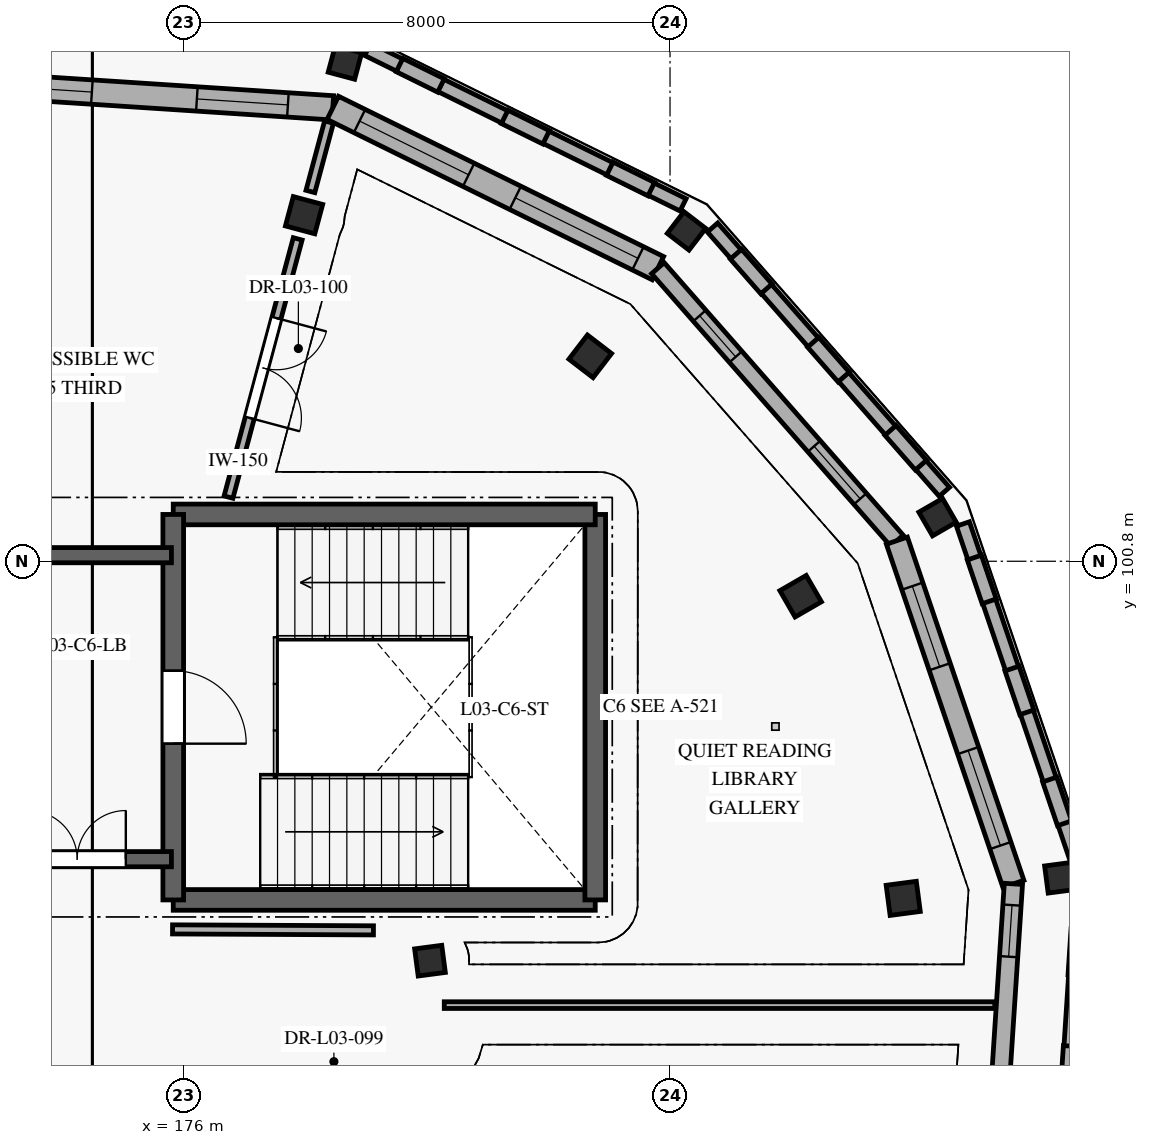
"""IFC4 building model, lengths in metres.
Left out: names, types, materials, properties, quantities, classifications, styles, units other than length and angle.
Written with IfcOpenShell. Run it as: python <this file> out.ifc"""

import sys

from ifc_helpers import new_model, si_unit, direction, frame, frame_2d, origin, origin_2d, place, context, subcontext, project, spatial, rectangle, extrude, element, fill, save


model = new_model("IFC4")
c1 = context("Model", 3, precision=1e-05, world=origin(), true_north=direction((0.0, 1.0)))
c2 = subcontext(c1, "Body", "Model", "MODEL_VIEW")
j1 = project(units=[si_unit("LENGTHUNIT", "METRE"), si_unit("PLANEANGLEUNIT", "RADIAN")], contexts=[c1])
p1 = place(None, origin())
s1 = spatial("IfcSite", under=j1, at=p1, CompositionType="ELEMENT")
p2 = place(p1, origin())
s2 = spatial("IfcBuilding", under=s1, at=p2, CompositionType="ELEMENT")
p3 = place(p2, frame((0.0, 0.0, 12.6)))
s3 = spatial("IfcBuildingStorey", under=s2, at=p3, CompositionType="ELEMENT", Elevation=12.6)
for number, where, z_axis, x_axis in (
    (1, (190.413, 95.595, 0.0), (0.0, 0.0, 1.0), (-0.131, 0.991, 0.0)),
    (2, (188.4, 101.525, 0.0), (0.0, 0.0, 1.0), (-0.5, 0.866, 0.0)),
    (3, (184.271, 106.233, 0.0), (0.0, 0.0, 1.0), (-0.793, 0.609, 0.0)),
    (4, (178.654, 109.003, 0.0), (0.0, 0.0, 1.0), (-0.966, 0.259, 0.0)),
):
    element("IfcColumn", number, at=place(p3, frame(where, z_axis=z_axis, x_axis=x_axis)), inside=s3, PredefinedType="COLUMN", context=c2, shape_type="SweptSolid", body=[
        extrude(rectangle(XDim=0.45, YDim=0.45, at=origin_2d()), origin(), (0.0, 0.0, 1.0), 4.2),
    ])
for number, where, z_axis, x_axis in (
    (5, (187.835, 95.256, 0.0), (0.0, 0.0, 1.0), (-0.131, 0.991, 0.0)),
    (6, (186.148, 100.225, 0.0), (0.0, 0.0, 1.0), (-0.5, 0.866, 0.0)),
    (7, (182.688, 104.171, 0.0), (0.0, 0.0, 1.0), (-0.793, 0.609, 0.0)),
    (8, (177.981, 106.492, 0.0), (0.0, 0.0, 1.0), (-0.966, 0.259, 0.0)),
):
    element("IfcColumn", number, at=place(p3, frame(where, z_axis=z_axis, x_axis=x_axis)), inside=s3, PredefinedType="COLUMN", context=c2, shape_type="SweptSolid", body=[
        extrude(rectangle(XDim=0.5, YDim=0.5, at=origin_2d()), origin(), (0.0, 0.0, 1.0), 4.2),
    ])
p4 = place(p3, frame((180.052, 94.231, 0.0), z_axis=(0.0, 0.0, 1.0), x_axis=(0.991444861374, 0.13052619222, 0.0)))
e9 = element("IfcColumn", 9, at=p4, inside=s3, PredefinedType="COLUMN", context=c2, shape_type="SweptSolid", body=[
    extrude(rectangle(XDim=0.45, YDim=0.45, at=origin_2d()), origin(), (0.0, 0.0, 1.0), 4.2),
])
p5 = place(p3, frame((172.506, 108.647, 0.0), z_axis=(0.0, 0.0, 1.0), x_axis=(0.997858658418, -0.065407169492, 0.0)))
e10 = element("IfcWall", 10, at=p5, inside=s3, PredefinedType="SOLIDWALL", context=c2, shape_type="SweptSolid", body=[
    extrude(rectangle(XDim=5.961, YDim=0.4, at=frame_2d((2.98, 0.0))), origin(), (0.0, 0.0, 1.0), 3.94),
])
p6 = place(p5, frame((0.99, 0.0, 0.85)))
e11 = element("IfcOpeningElement", 11, at=p6, cuts=e10, PredefinedType="OPENING", context=c2, shape_type="SweptSolid", body=[
    extrude(rectangle(XDim=1.0, YDim=1.3, at=frame_2d((0.5, 0.65))), frame((0.0, 0.21, 0.0), z_axis=(0.0, -1.0, 0.0), x_axis=(1.0, 0.0, 0.0)), (0.0, 0.0, 1.0), 0.42),
])
p7 = place(p5, frame((3.721, 0.0, 0.85)))
e12 = element("IfcOpeningElement", 12, at=p7, cuts=e10, PredefinedType="OPENING", context=c2, shape_type="SweptSolid", body=[
    extrude(rectangle(XDim=1.5, YDim=1.3, at=frame_2d((0.75, 0.65))), frame((0.0, 0.21, 0.0), z_axis=(0.0, -1.0, 0.0), x_axis=(1.0, 0.0, 0.0)), (0.0, 0.0, 1.0), 0.42),
])
p8 = place(p3, frame((178.454, 108.257, 0.0), z_axis=(0.0, 0.0, 1.0), x_axis=(0.896879104746, -0.442275786664, 0.0)))
e13 = element("IfcWall", 13, at=p8, inside=s3, PredefinedType="SOLIDWALL", context=c2, shape_type="SweptSolid", body=[
    extrude(rectangle(XDim=5.961, YDim=0.425, at=frame_2d((2.98, 0.0))), origin(), (0.0, 0.0, 1.0), 3.94),
])
p9 = place(p8, frame((0.49, 0.0, 0.85)))
e14 = element("IfcOpeningElement", 14, at=p9, cuts=e13, PredefinedType="OPENING", context=c2, shape_type="SweptSolid", body=[
    extrude(rectangle(XDim=2.0, YDim=1.3, at=frame_2d((1.0, 0.65))), frame((0.0, 0.222, 0.0), z_axis=(0.0, -1.0, 0.0), x_axis=(1.0, 0.0, 0.0)), (0.0, 0.0, 1.0), 0.445),
])
p10 = place(p8, frame((3.346, 0.0, 0.85)))
e15 = element("IfcOpeningElement", 15, at=p10, cuts=e13, PredefinedType="OPENING", context=c2, shape_type="SweptSolid", body=[
    extrude(rectangle(XDim=2.25, YDim=1.3, at=frame_2d((1.125, 0.65))), frame((0.0, 0.222, 0.0), z_axis=(0.0, -1.0, 0.0), x_axis=(1.0, 0.0, 0.0)), (0.0, 0.0, 1.0), 0.445),
])
p11 = place(p3, frame((183.801, 105.621, 0.0), z_axis=(0.0, 0.0, 1.0), x_axis=(0.659353757459, -0.751832842143, 0.0)))
e16 = element("IfcWall", 16, at=p11, inside=s3, PredefinedType="SOLIDWALL", context=c2, shape_type="SweptSolid", body=[
    extrude(rectangle(XDim=5.961, YDim=0.275, at=frame_2d((2.98, 0.0))), origin(), (0.0, 0.0, 1.0), 3.94),
])
p12 = place(p11, frame((1.04, 0.0, 0.85)))
e17 = element("IfcOpeningElement", 17, at=p12, cuts=e16, PredefinedType="OPENING", context=c2, shape_type="SweptSolid", body=[
    extrude(rectangle(XDim=0.9, YDim=1.6, at=frame_2d((0.45, 0.8))), frame((0.0, 0.147, 0.0), z_axis=(0.0, -1.0, 0.0), x_axis=(1.0, 0.0, 0.0)), (0.0, 0.0, 1.0), 0.295),
])
p13 = place(p11, frame((3.896, 0.0, 0.85)))
e18 = element("IfcOpeningElement", 18, at=p13, cuts=e16, PredefinedType="OPENING", context=c2, shape_type="SweptSolid", body=[
    extrude(rectangle(XDim=1.15, YDim=1.5, at=frame_2d((0.575, 0.75))), frame((0.0, 0.147, 0.0), z_axis=(0.0, -1.0, 0.0), x_axis=(1.0, 0.0, 0.0)), (0.0, 0.0, 1.0), 0.295),
])
p14 = place(p3, frame((187.731, 101.139, 0.0), z_axis=(0.0, 0.0, 1.0), x_axis=(0.321420298269, -0.94693663561, 0.0)))
e19 = element("IfcWall", 19, at=p14, inside=s3, PredefinedType="SOLIDWALL", context=c2, shape_type="SweptSolid", body=[
    extrude(rectangle(XDim=5.961, YDim=0.365, at=frame_2d((2.98, 0.0))), origin(), (0.0, 0.0, 1.0), 3.94),
])
p15 = place(p14, frame((0.79, 0.0, 0.85)))
e20 = element("IfcOpeningElement", 20, at=p15, cuts=e19, PredefinedType="OPENING", context=c2, shape_type="SweptSolid", body=[
    extrude(rectangle(XDim=1.4, YDim=1.5, at=frame_2d((0.7, 0.75))), frame((0.0, 0.192, 0.0), z_axis=(0.0, -1.0, 0.0), x_axis=(1.0, 0.0, 0.0)), (0.0, 0.0, 1.0), 0.385),
])
p16 = place(p14, frame((3.646, 0.0, 0.85)))
e21 = element("IfcOpeningElement", 21, at=p16, cuts=e19, PredefinedType="OPENING", context=c2, shape_type="SweptSolid", body=[
    extrude(rectangle(XDim=1.65, YDim=1.5, at=frame_2d((0.825, 0.75))), frame((0.0, 0.192, 0.0), z_axis=(0.0, -1.0, 0.0), x_axis=(1.0, 0.0, 0.0)), (0.0, 0.0, 1.0), 0.385),
])
p17 = place(p3, frame((189.647, 95.494, 0.0), z_axis=(0.0, 0.0, 1.0), x_axis=(-0.065407169492, -0.997858658418, 0.0)))
e22 = element("IfcWall", 22, at=p17, inside=s3, PredefinedType="SOLIDWALL", context=c2, shape_type="SweptSolid", body=[
    extrude(rectangle(XDim=5.961, YDim=0.3, at=frame_2d((2.98, 0.0))), origin(), (0.0, 0.0, 1.0), 3.94),
])
p18 = place(p17, frame((0.35, 0.0, 0.85)))
e23 = element("IfcOpeningElement", 23, at=p18, cuts=e22, PredefinedType="OPENING", context=c2, shape_type="SweptSolid", body=[
    extrude(rectangle(XDim=0.85, YDim=1.4, at=frame_2d((0.425, 0.7))), frame((0.0, 0.16, 0.0), z_axis=(0.0, -1.0, 0.0), x_axis=(1.0, 0.0, 0.0)), (0.0, 0.0, 1.0), 0.32),
])
p19 = place(p17, frame((3.396, 0.0, 0.85)))
e24 = element("IfcOpeningElement", 24, at=p19, cuts=e22, PredefinedType="OPENING", context=c2, shape_type="SweptSolid", body=[
    extrude(rectangle(XDim=2.15, YDim=1.5, at=frame_2d((1.075, 0.75))), frame((0.0, 0.16, 0.0), z_axis=(0.0, -1.0, 0.0), x_axis=(1.0, 0.0, 0.0)), (0.0, 0.0, 1.0), 0.32),
])
p20 = place(p3, frame((190.676, 95.938, 0.0), z_axis=(0.0, 0.0, 1.0), x_axis=(-0.321403850935, 0.946942218197, 0.0)))
e25 = element("IfcWall", 25, at=p20, inside=s3, PredefinedType="ELEMENTEDWALL", context=c2, shape_type="SweptSolid", body=[
    extrude(rectangle(XDim=5.782, YDim=0.225, at=frame_2d((2.891, 0.0))), origin(), (0.0, 0.0, 1.0), 1.09),
])
for number, where, z_axis, x_axis in (
    (26, (190.488, 96.49, 1.09), (0.0, 0.0, 1.0), (-0.322, 0.947, 0.0)),
    (27, (189.869, 98.316, 1.09), (0.0, 0.0, 1.0), (-0.321, 0.947, 0.0)),
    (28, (189.249, 100.141, 1.09), (0.0, 0.0, 1.0), (-0.322, 0.947, 0.0)),
):
    element("IfcWall", number, at=place(p3, frame(where, z_axis=z_axis, x_axis=x_axis)), inside=s3, PredefinedType="ELEMENTEDWALL", context=c2, shape_type="SweptSolid", body=[
        extrude(rectangle(XDim=0.76, YDim=0.245, at=frame_2d((0.38, 0.0))), origin(), (0.0, 0.0, 1.0), 2.85),
    ])
p21 = place(p3, frame((188.512, 101.942, 0.0), z_axis=(0.0, 0.0, 1.0), x_axis=(-0.659335243923, 0.751849078021, 0.0)))
e29 = element("IfcWall", 29, at=p21, inside=s3, PredefinedType="ELEMENTEDWALL", context=c2, shape_type="SweptSolid", body=[
    extrude(rectangle(XDim=5.782, YDim=0.225, at=frame_2d((2.891, 0.0))), origin(), (0.0, 0.0, 1.0), 1.09),
])
p22 = place(p3, frame((188.127, 102.381, 1.09), z_axis=(0.0, 0.0, 1.0), x_axis=(-0.659504701015, 0.751700438565, 0.0)))
e30 = element("IfcWall", 30, at=p22, inside=s3, PredefinedType="ELEMENTEDWALL", context=c2, shape_type="SweptSolid", body=[
    extrude(rectangle(XDim=0.76, YDim=0.245, at=frame_2d((0.38, 0.0))), origin(), (0.0, 0.0, 1.0), 2.85),
])
p23 = place(p3, frame((186.856, 103.83, 1.09), z_axis=(0.0, 0.0, 1.0), x_axis=(-0.659345470196, 0.751840109951, 0.0)))
e31 = element("IfcWall", 31, at=p23, inside=s3, PredefinedType="ELEMENTEDWALL", context=c2, shape_type="SweptSolid", body=[
    extrude(rectangle(XDim=0.76, YDim=0.245, at=frame_2d((0.38, 0.0))), origin(), (0.0, 0.0, 1.0), 2.85),
])
p24 = place(p3, frame((185.585, 105.279, 1.09), z_axis=(0.0, 0.0, 1.0), x_axis=(-0.659504701015, 0.751700438565, 0.0)))
e32 = element("IfcWall", 32, at=p24, inside=s3, PredefinedType="ELEMENTEDWALL", context=c2, shape_type="SweptSolid", body=[
    extrude(rectangle(XDim=0.76, YDim=0.245, at=frame_2d((0.38, 0.0))), origin(), (0.0, 0.0, 1.0), 2.85),
])
p25 = place(p3, frame((184.215, 106.662, 0.0), z_axis=(0.0, 0.0, 1.0), x_axis=(-0.896862382364, 0.442309695915, 0.0)))
e33 = element("IfcWall", 33, at=p25, inside=s3, PredefinedType="ELEMENTEDWALL", context=c2, shape_type="SweptSolid", body=[
    extrude(rectangle(XDim=5.783, YDim=0.225, at=frame_2d((2.892, 0.0))), origin(), (0.0, 0.0, 1.0), 1.09),
])
for number, where, z_axis, x_axis in (
    (34, (183.691, 106.92, 1.09), (0.0, 0.0, 1.0), (-0.897, 0.442, 0.0)),
    (35, (181.962, 107.772, 1.09), (0.0, 0.0, 1.0), (-0.897, 0.442, 0.0)),
):
    element("IfcWall", number, at=place(p3, frame(where, z_axis=z_axis, x_axis=x_axis)), inside=s3, PredefinedType="ELEMENTEDWALL", context=c2, shape_type="SweptSolid", body=[
        extrude(rectangle(XDim=0.76, YDim=0.245, at=frame_2d((0.38, 0.0))), origin(), (0.0, 0.0, 1.0), 2.85),
    ])
p26 = place(p3, frame((180.233, 108.625, 1.09), z_axis=(0.0, 0.0, 1.0), x_axis=(-0.896792285629, 0.442451801258, 0.0)))
e36 = element("IfcWall", 36, at=p26, inside=s3, PredefinedType="ELEMENTEDWALL", context=c2, shape_type="SweptSolid", body=[
    extrude(rectangle(XDim=0.76, YDim=0.245, at=frame_2d((0.38, 0.0))), origin(), (0.0, 0.0, 1.0), 2.85),
])
p27 = place(p3, frame((190.377, 89.562, 0.0), z_axis=(0.0, 0.0, 1.0), x_axis=(0.065400850615, 0.997859072584, 0.0)))
e37 = element("IfcWall", 37, at=p27, inside=s3, PredefinedType="ELEMENTEDWALL", context=c2, shape_type="SweptSolid", body=[
    extrude(rectangle(XDim=5.782, YDim=0.225, at=frame_2d((2.891, 0.0))), origin(), (0.0, 0.0, 1.0), 1.09),
])
for number, where, z_axis, x_axis in (
    (38, (190.542, 92.068, 1.09), (0.0, 0.0, 1.0), (0.066, 0.998, 0.0)),
    (39, (190.668, 93.991, 1.09), (0.0, 0.0, 1.0), (0.066, 0.998, 0.0)),
):
    element("IfcWall", number, at=place(p3, frame(where, z_axis=z_axis, x_axis=x_axis)), inside=s3, PredefinedType="ELEMENTEDWALL", context=c2, shape_type="SweptSolid", body=[
        extrude(rectangle(XDim=0.76, YDim=0.245, at=frame_2d((0.38, 0.0))), origin(), (0.0, 0.0, 1.0), 2.85),
    ])
p28 = place(p3, frame((175.83, 95.23, 0.0), z_axis=(0.0, 0.0, 1.0), x_axis=(1.0, 0.0, 0.0)))
e40 = element("IfcWall", 40, at=p28, inside=s3, PredefinedType="SHEAR", context=c2, shape_type="SweptSolid", body=[
    extrude(rectangle(XDim=6.94, YDim=0.34, at=frame_2d((3.47, 0.0))), origin(), (0.0, 0.0, 1.0), 3.95),
])
p29 = place(p3, frame((182.77, 95.23, 0.0), z_axis=(0.0, 0.0, 1.0), x_axis=(0.0, 1.0, 0.0)))
e41 = element("IfcWall", 41, at=p29, inside=s3, PredefinedType="SHEAR", context=c2, shape_type="SweptSolid", body=[
    extrude(rectangle(XDim=6.34, YDim=0.34, at=frame_2d((3.17, 0.0))), origin(), (0.0, 0.0, 1.0), 3.95),
])
p30 = place(p3, frame((182.77, 101.57, 0.0), z_axis=(0.0, 0.0, 1.0), x_axis=(-1.0, 0.0, 0.0)))
e42 = element("IfcWall", 42, at=p30, inside=s3, PredefinedType="SHEAR", context=c2, shape_type="SweptSolid", body=[
    extrude(rectangle(XDim=6.94, YDim=0.34, at=frame_2d((3.47, 0.0))), origin(), (0.0, 0.0, 1.0), 3.95),
])
p31 = place(p3, frame((175.83, 101.57, 0.0), z_axis=(0.0, 0.0, 1.0), x_axis=(0.0, -1.0, 0.0)))
e43 = element("IfcWall", 43, at=p31, inside=s3, PredefinedType="SHEAR", context=c2, shape_type="SweptSolid", body=[
    extrude(rectangle(XDim=6.34, YDim=0.34, at=frame_2d((3.17, 0.0))), origin(), (0.0, 0.0, 1.0), 3.95),
])
p32 = place(p31, frame((2.57, 0.0, 0.0)))
e44 = element("IfcOpeningElement", 44, at=p32, cuts=e43, PredefinedType="OPENING", context=c2, shape_type="SweptSolid", body=[
    extrude(rectangle(XDim=1.2, YDim=2.1, at=frame_2d((0.6, 1.05))), frame((0.0, 0.18, 0.0), z_axis=(0.0, -1.0, 0.0), x_axis=(1.0, 0.0, 0.0)), (0.0, 0.0, 1.0), 0.36),
])
p33 = place(p3, frame((172.7, 95.9, 0.0), z_axis=(0.0, 0.0, 1.0), x_axis=(1.0, 0.0, 0.0)))
e45 = element("IfcWall", 45, at=p33, inside=s3, PredefinedType="SHEAR", context=c2, shape_type="SweptSolid", body=[
    extrude(rectangle(XDim=3.1, YDim=0.25, at=frame_2d((1.55, 0.0))), origin(), (0.0, 0.0, 1.0), 3.95),
])
p34 = place(p33, frame((0.75, 0.0, 0.0)))
e46 = element("IfcOpeningElement", 46, at=p34, cuts=e45, PredefinedType="OPENING", context=c2, shape_type="SweptSolid", body=[
    extrude(rectangle(XDim=1.6, YDim=2.15, at=frame_2d((0.8, 1.075))), frame((0.0, 0.135, 0.0), z_axis=(0.0, -1.0, 0.0), x_axis=(1.0, 0.0, 0.0)), (0.0, 0.0, 1.0), 0.27),
])
p35 = place(p3, frame((175.8, 100.9, 0.0), z_axis=(0.0, 0.0, 1.0), x_axis=(-1.0, 0.0, 0.0)))
e47 = element("IfcWall", 47, at=p35, inside=s3, PredefinedType="SHEAR", context=c2, shape_type="SweptSolid", body=[
    extrude(rectangle(XDim=3.1, YDim=0.25, at=frame_2d((1.55, 0.0))), origin(), (0.0, 0.0, 1.0), 3.95),
])
p36 = place(p3, frame((189.341, 93.5, 0.0), z_axis=(0.0, 0.0, 1.0), x_axis=(-1.0, 0.0, 0.0)))
e48 = element("IfcWall", 48, at=p36, inside=s3, PredefinedType="PARTITIONING", context=c2, shape_type="SweptSolid", body=[
    extrude(rectangle(XDim=9.054, YDim=0.11, at=frame_2d((4.527, 0.0))), origin(), (0.0, 0.0, 1.0), 3.915),
])
p37 = place(p3, frame((178.392, 108.023, 0.0), z_axis=(0.0, 0.0, 1.0), x_axis=(-0.258884109648, -0.965908389948, 0.0)))
e49 = element("IfcWall", 49, at=p37, inside=s3, PredefinedType="PARTITIONING", context=c2, shape_type="SweptSolid", body=[
    extrude(rectangle(XDim=1.182, YDim=0.15, at=frame_2d((0.591, 0.0))), origin(), (0.0, 0.0, 1.0), 3.117),
])
p38 = place(p3, frame((177.877, 106.102, 0.0), z_axis=(0.0, 0.0, 1.0), x_axis=(-0.25879251633, -0.965932934262, 0.0)))
e50 = element("IfcWall", 50, at=p38, inside=s3, PredefinedType="PARTITIONING", context=c2, shape_type="SweptSolid", body=[
    extrude(rectangle(XDim=4.397, YDim=0.15, at=frame_2d((2.199, 0.0))), origin(), (0.0, 0.0, 1.0), 3.915),
])
p39 = place(p38, frame((1.348, 0.0, 0.0)))
e51 = element("IfcOpeningElement", 51, at=p39, cuts=e50, PredefinedType="OPENING", context=c2, shape_type="SweptSolid", body=[
    extrude(rectangle(XDim=1.7, YDim=2.18, at=frame_2d((0.85, 1.09))), frame((0.0, 0.085, 0.0), z_axis=(0.0, -1.0, 0.0), x_axis=(1.0, 0.0, 0.0)), (0.0, 0.0, 1.0), 0.17),
])
p40 = place(p3, frame((175.818, 94.745, 0.0), z_axis=(0.0, 0.0, 1.0), x_axis=(0.999988467144, -0.004802663689, 0.0)))
e52 = element("IfcWall", 52, at=p40, inside=s3, PredefinedType="PARTITIONING", context=c2, shape_type="SweptSolid", body=[
    extrude(rectangle(XDim=3.304, YDim=0.15, at=frame_2d((1.652, 0.0))), origin(), (0.0, 0.0, 1.0), 3.915),
])
p41 = place(p6, origin())
e53 = element("IfcWindow", 53, at=p41, inside=s3, PartitioningType="SINGLE_PANEL", PredefinedType="WINDOW", context=c2, shape_type="SweptSolid", body=[
    extrude(rectangle(XDim=1.0, YDim=1.3, at=frame_2d((0.5, 0.65))), frame((0.0, 0.03, 0.0), z_axis=(0.0, -1.0, 0.0), x_axis=(1.0, 0.0, 0.0)), (0.0, 0.0, 1.0), 0.06),
])
fill(e11, e53)
p42 = place(p7, origin())
e54 = element("IfcWindow", 54, at=p42, inside=s3, PartitioningType="SINGLE_PANEL", PredefinedType="WINDOW", context=c2, shape_type="SweptSolid", body=[
    extrude(rectangle(XDim=1.5, YDim=1.3, at=frame_2d((0.75, 0.65))), frame((0.0, 0.03, 0.0), z_axis=(0.0, -1.0, 0.0), x_axis=(1.0, 0.0, 0.0)), (0.0, 0.0, 1.0), 0.06),
])
fill(e12, e54)
p43 = place(p9, origin())
e55 = element("IfcWindow", 55, at=p43, inside=s3, PartitioningType="SINGLE_PANEL", PredefinedType="WINDOW", context=c2, shape_type="SweptSolid", body=[
    extrude(rectangle(XDim=2.0, YDim=1.3, at=frame_2d((1.0, 0.65))), frame((0.0, 0.03, 0.0), z_axis=(0.0, -1.0, 0.0), x_axis=(1.0, 0.0, 0.0)), (0.0, 0.0, 1.0), 0.06),
])
fill(e14, e55)
p44 = place(p10, origin())
e56 = element("IfcWindow", 56, at=p44, inside=s3, PartitioningType="SINGLE_PANEL", PredefinedType="WINDOW", context=c2, shape_type="SweptSolid", body=[
    extrude(rectangle(XDim=2.25, YDim=1.3, at=frame_2d((1.125, 0.65))), frame((0.0, 0.03, 0.0), z_axis=(0.0, -1.0, 0.0), x_axis=(1.0, 0.0, 0.0)), (0.0, 0.0, 1.0), 0.06),
])
fill(e15, e56)
p45 = place(p12, origin())
e57 = element("IfcWindow", 57, at=p45, inside=s3, PartitioningType="SINGLE_PANEL", PredefinedType="WINDOW", context=c2, shape_type="SweptSolid", body=[
    extrude(rectangle(XDim=0.9, YDim=1.6, at=frame_2d((0.45, 0.8))), frame((0.0, 0.03, 0.0), z_axis=(0.0, -1.0, 0.0), x_axis=(1.0, 0.0, 0.0)), (0.0, 0.0, 1.0), 0.06),
])
fill(e17, e57)
p46 = place(p13, origin())
e58 = element("IfcWindow", 58, at=p46, inside=s3, PartitioningType="SINGLE_PANEL", PredefinedType="WINDOW", context=c2, shape_type="SweptSolid", body=[
    extrude(rectangle(XDim=1.15, YDim=1.5, at=frame_2d((0.575, 0.75))), frame((0.0, 0.03, 0.0), z_axis=(0.0, -1.0, 0.0), x_axis=(1.0, 0.0, 0.0)), (0.0, 0.0, 1.0), 0.06),
])
fill(e18, e58)
p47 = place(p15, origin())
e59 = element("IfcWindow", 59, at=p47, inside=s3, PartitioningType="SINGLE_PANEL", PredefinedType="WINDOW", context=c2, shape_type="SweptSolid", body=[
    extrude(rectangle(XDim=1.4, YDim=1.5, at=frame_2d((0.7, 0.75))), frame((0.0, 0.03, 0.0), z_axis=(0.0, -1.0, 0.0), x_axis=(1.0, 0.0, 0.0)), (0.0, 0.0, 1.0), 0.06),
])
fill(e20, e59)
p48 = place(p16, origin())
e60 = element("IfcWindow", 60, at=p48, inside=s3, PartitioningType="SINGLE_PANEL", PredefinedType="WINDOW", context=c2, shape_type="SweptSolid", body=[
    extrude(rectangle(XDim=1.65, YDim=1.5, at=frame_2d((0.825, 0.75))), frame((0.0, 0.03, 0.0), z_axis=(0.0, -1.0, 0.0), x_axis=(1.0, 0.0, 0.0)), (0.0, 0.0, 1.0), 0.06),
])
fill(e21, e60)
p49 = place(p18, origin())
e61 = element("IfcWindow", 61, at=p49, inside=s3, PartitioningType="SINGLE_PANEL", PredefinedType="WINDOW", context=c2, shape_type="SweptSolid", body=[
    extrude(rectangle(XDim=0.85, YDim=1.4, at=frame_2d((0.425, 0.7))), frame((0.0, 0.03, 0.0), z_axis=(0.0, -1.0, 0.0), x_axis=(1.0, 0.0, 0.0)), (0.0, 0.0, 1.0), 0.06),
])
fill(e23, e61)
p50 = place(p32, origin())
e62 = element("IfcDoor", 62, at=p50, inside=s3, OperationType="SINGLE_SWING_RIGHT", PredefinedType="DOOR", context=c2, shape_type="SweptSolid", body=[
    extrude(rectangle(XDim=1.2, YDim=2.1, at=frame_2d((0.6, 1.05))), frame((0.0, 0.025, 0.0), z_axis=(0.0, -1.0, 0.0), x_axis=(1.0, 0.0, 0.0)), (0.0, 0.0, 1.0), 0.05),
])
fill(e44, e62)
p51 = place(p34, origin())
e63 = element("IfcDoor", 63, at=p51, inside=s3, OperationType="DOUBLE_DOOR_SINGLE_SWING", PredefinedType="DOOR", context=c2, shape_type="SweptSolid", body=[
    extrude(rectangle(XDim=1.6, YDim=2.15, at=frame_2d((0.8, 1.075))), frame((0.0, 0.025, 0.0), z_axis=(0.0, -1.0, 0.0), x_axis=(1.0, 0.0, 0.0)), (0.0, 0.0, 1.0), 0.05),
])
fill(e46, e63)
p52 = place(p39, origin())
e64 = element("IfcDoor", 64, at=p52, inside=s3, OperationType="DOUBLE_DOOR_SINGLE_SWING", PredefinedType="DOOR", context=c2, shape_type="SweptSolid", body=[
    extrude(rectangle(XDim=1.7, YDim=2.18, at=frame_2d((0.85, 1.09))), frame((0.0, 0.025, 0.0), z_axis=(0.0, -1.0, 0.0), x_axis=(1.0, 0.0, 0.0)), (0.0, 0.0, 1.0), 0.05),
])
fill(e51, e64)
save(model, sys.argv[1])
